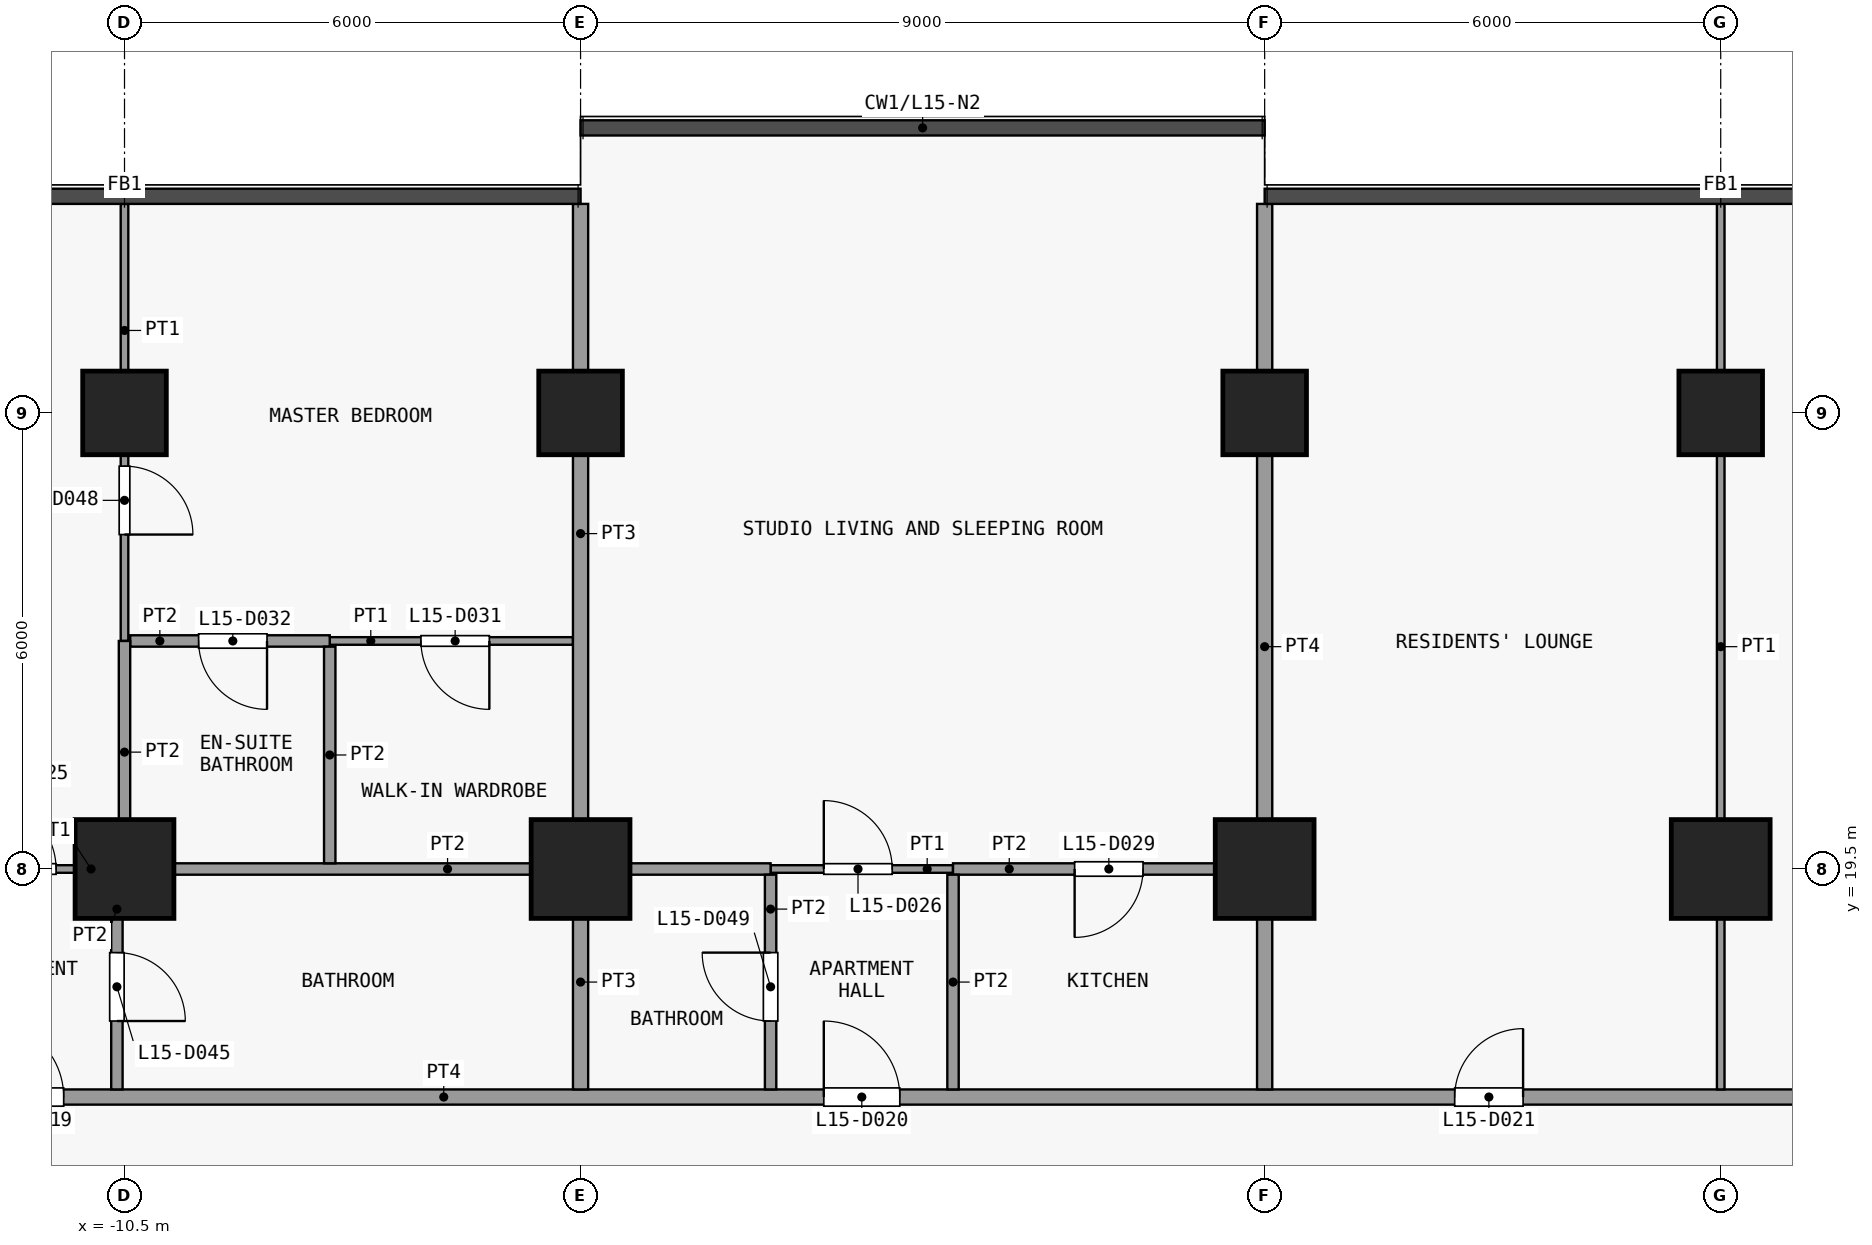
"""IFC4 building model, lengths in metres.
Left out: names, types, materials, properties, quantities, classifications, styles, units other than length and angle.
Written with IfcOpenShell. Run it as: python <this file> out.ifc"""

import sys

from ifc_helpers import new_model, si_unit, direction, frame, frame_2d, origin, origin_2d, place, context, subcontext, project, spatial, rectangle, extrude, element, fill, save


model = new_model("IFC4")
c1 = context("Model", 3, precision=1e-05, world=origin(), true_north=direction((0.0, 1.0)))
c2 = subcontext(c1, "Body", "Model", "MODEL_VIEW")
j1 = project(units=[si_unit("LENGTHUNIT", "METRE"), si_unit("PLANEANGLEUNIT", "RADIAN")], contexts=[c1])
p1 = place(None, origin())
s1 = spatial("IfcSite", under=j1, at=p1, CompositionType="ELEMENT")
p2 = place(p1, origin())
s2 = spatial("IfcBuilding", under=s1, at=p2, CompositionType="ELEMENT")
p3 = place(p2, frame((0.0, 0.0, 64.9)))
s3 = spatial("IfcBuildingStorey", under=s2, at=p3, CompositionType="ELEMENT", Elevation=64.9)
p4 = place(p3, frame((-10.5, 19.5, 0.0), z_axis=(0.0, 0.0, 1.0), x_axis=(1.0, 0.0, 0.0)))
e1 = element("IfcColumn", 1, at=p4, inside=s3, PredefinedType="COLUMN", context=c2, shape_type="SweptSolid", body=[
    extrude(rectangle(XDim=1.3, YDim=1.3, at=origin_2d()), origin(), (0.0, 0.0, 1.0), 3.6),
])
p5 = place(p3, frame((-10.5, 25.5, 0.0), z_axis=(0.0, 0.0, 1.0), x_axis=(1.0, 0.0, 0.0)))
e2 = element("IfcColumn", 2, at=p5, inside=s3, PredefinedType="COLUMN", context=c2, shape_type="SweptSolid", body=[
    extrude(rectangle(XDim=1.1, YDim=1.1, at=origin_2d()), origin(), (0.0, 0.0, 1.0), 3.6),
])
p6 = place(p3, frame((-4.5, 19.5, 0.0), z_axis=(0.0, 0.0, 1.0), x_axis=(1.0, 0.0, 0.0)))
e3 = element("IfcColumn", 3, at=p6, inside=s3, PredefinedType="COLUMN", context=c2, shape_type="SweptSolid", body=[
    extrude(rectangle(XDim=1.3, YDim=1.3, at=origin_2d()), origin(), (0.0, 0.0, 1.0), 3.6),
])
p7 = place(p3, frame((-4.5, 25.5, 0.0), z_axis=(0.0, 0.0, 1.0), x_axis=(1.0, 0.0, 0.0)))
e4 = element("IfcColumn", 4, at=p7, inside=s3, PredefinedType="COLUMN", context=c2, shape_type="SweptSolid", body=[
    extrude(rectangle(XDim=1.1, YDim=1.1, at=origin_2d()), origin(), (0.0, 0.0, 1.0), 3.6),
])
p8 = place(p3, frame((4.5, 19.5, 0.0), z_axis=(0.0, 0.0, 1.0), x_axis=(1.0, 0.0, 0.0)))
e5 = element("IfcColumn", 5, at=p8, inside=s3, PredefinedType="COLUMN", context=c2, shape_type="SweptSolid", body=[
    extrude(rectangle(XDim=1.3, YDim=1.3, at=origin_2d()), origin(), (0.0, 0.0, 1.0), 3.6),
])
p9 = place(p3, frame((4.5, 25.5, 0.0), z_axis=(0.0, 0.0, 1.0), x_axis=(1.0, 0.0, 0.0)))
e6 = element("IfcColumn", 6, at=p9, inside=s3, PredefinedType="COLUMN", context=c2, shape_type="SweptSolid", body=[
    extrude(rectangle(XDim=1.1, YDim=1.1, at=origin_2d()), origin(), (0.0, 0.0, 1.0), 3.6),
])
p10 = place(p3, frame((10.5, 19.5, 0.0), z_axis=(0.0, 0.0, 1.0), x_axis=(1.0, 0.0, 0.0)))
e7 = element("IfcColumn", 7, at=p10, inside=s3, PredefinedType="COLUMN", context=c2, shape_type="SweptSolid", body=[
    extrude(rectangle(XDim=1.3, YDim=1.3, at=origin_2d()), origin(), (0.0, 0.0, 1.0), 3.6),
])
p11 = place(p3, frame((10.5, 25.5, 0.0), z_axis=(0.0, 0.0, 1.0), x_axis=(1.0, 0.0, 0.0)))
e8 = element("IfcColumn", 8, at=p11, inside=s3, PredefinedType="COLUMN", context=c2, shape_type="SweptSolid", body=[
    extrude(rectangle(XDim=1.1, YDim=1.1, at=origin_2d()), origin(), (0.0, 0.0, 1.0), 3.6),
])
p12 = place(p3, frame((-25.35, 16.5, 0.0), z_axis=(0.0, 0.0, 1.0), x_axis=(1.0, 0.0, 0.0)))
e9 = element("IfcWall", 9, at=p12, inside=s3, PredefinedType="PARTITIONING", context=c2, shape_type="SweptSolid", body=[
    extrude(rectangle(XDim=51.6, YDim=0.2, at=frame_2d((25.8, 0.0))), origin(), (0.0, 0.0, 1.0), 3.3),
])
p13 = place(p12, frame((4.55, 0.0, 0.0)))
e10 = element("IfcOpeningElement", 10, at=p13, cuts=e9, PredefinedType="OPENING", context=c2, shape_type="SweptSolid", body=[
    extrude(rectangle(XDim=1.0, YDim=2.1, at=frame_2d((0.5, 1.05))), frame((0.0, 0.11, 0.0), z_axis=(0.0, -1.0, 0.0), x_axis=(1.0, 0.0, 0.0)), (0.0, 0.0, 1.0), 0.22),
])
p14 = place(p12, frame((13.05, 0.0, 0.0)))
e11 = element("IfcOpeningElement", 11, at=p14, cuts=e9, PredefinedType="OPENING", context=c2, shape_type="SweptSolid", body=[
    extrude(rectangle(XDim=1.0, YDim=2.1, at=frame_2d((0.5, 1.05))), frame((0.0, 0.11, 0.0), z_axis=(0.0, -1.0, 0.0), x_axis=(1.0, 0.0, 0.0)), (0.0, 0.0, 1.0), 0.22),
])
p15 = place(p12, frame((24.05, 0.0, 0.0)))
e12 = element("IfcOpeningElement", 12, at=p15, cuts=e9, PredefinedType="OPENING", context=c2, shape_type="SweptSolid", body=[
    extrude(rectangle(XDim=1.0, YDim=2.1, at=frame_2d((0.5, 1.05))), frame((0.0, 0.11, 0.0), z_axis=(0.0, -1.0, 0.0), x_axis=(1.0, 0.0, 0.0)), (0.0, 0.0, 1.0), 0.22),
])
p16 = place(p12, frame((32.35, 0.0, 0.0)))
e13 = element("IfcOpeningElement", 13, at=p16, cuts=e9, PredefinedType="OPENING", context=c2, shape_type="SweptSolid", body=[
    extrude(rectangle(XDim=0.9, YDim=2.1, at=frame_2d((0.45, 1.05))), frame((0.0, 0.11, 0.0), z_axis=(0.0, -1.0, 0.0), x_axis=(1.0, 0.0, 0.0)), (0.0, 0.0, 1.0), 0.22),
])
p17 = place(p12, frame((38.35, 0.0, 0.0)))
e14 = element("IfcOpeningElement", 14, at=p17, cuts=e9, PredefinedType="OPENING", context=c2, shape_type="SweptSolid", body=[
    extrude(rectangle(XDim=0.9, YDim=2.1, at=frame_2d((0.45, 1.05))), frame((0.0, 0.11, 0.0), z_axis=(0.0, -1.0, 0.0), x_axis=(1.0, 0.0, 0.0)), (0.0, 0.0, 1.0), 0.22),
])
p18 = place(p12, frame((45.05, 0.0, 0.0)))
e15 = element("IfcOpeningElement", 15, at=p18, cuts=e9, PredefinedType="OPENING", context=c2, shape_type="SweptSolid", body=[
    extrude(rectangle(XDim=1.0, YDim=2.1, at=frame_2d((0.5, 1.05))), frame((0.0, 0.11, 0.0), z_axis=(0.0, -1.0, 0.0), x_axis=(1.0, 0.0, 0.0)), (0.0, 0.0, 1.0), 0.22),
])
p19 = place(p3, frame((-13.0, 19.5, 0.0), z_axis=(0.0, 0.0, 1.0), x_axis=(1.0, 0.0, 0.0)))
e16 = element("IfcWall", 16, at=p19, inside=s3, PredefinedType="PARTITIONING", context=c2, shape_type="SweptSolid", body=[
    extrude(rectangle(XDim=2.4, YDim=0.1, at=frame_2d((1.2, 0.0))), origin(), (0.0, 0.0, 1.0), 3.3),
])
p20 = place(p19, frame((0.7, 0.0, 0.0)))
e17 = element("IfcOpeningElement", 17, at=p20, cuts=e16, PredefinedType="OPENING", context=c2, shape_type="SweptSolid", body=[
    extrude(rectangle(XDim=0.9, YDim=2.1, at=frame_2d((0.45, 1.05))), frame((0.0, 0.06, 0.0), z_axis=(0.0, -1.0, 0.0), x_axis=(1.0, 0.0, 0.0)), (0.0, 0.0, 1.0), 0.12),
])
p21 = place(p3, frame((-2.0, 19.5, 0.0), z_axis=(0.0, 0.0, 1.0), x_axis=(1.0, 0.0, 0.0)))
e18 = element("IfcWall", 18, at=p21, inside=s3, PredefinedType="PARTITIONING", context=c2, shape_type="SweptSolid", body=[
    extrude(rectangle(XDim=2.4, YDim=0.1, at=frame_2d((1.2, 0.0))), origin(), (0.0, 0.0, 1.0), 3.3),
])
p22 = place(p21, frame((0.7, 0.0, 0.0)))
e19 = element("IfcOpeningElement", 19, at=p22, cuts=e18, PredefinedType="OPENING", context=c2, shape_type="SweptSolid", body=[
    extrude(rectangle(XDim=0.9, YDim=2.1, at=frame_2d((0.45, 1.05))), frame((0.0, 0.06, 0.0), z_axis=(0.0, -1.0, 0.0), x_axis=(1.0, 0.0, 0.0)), (0.0, 0.0, 1.0), 0.12),
])
p23 = place(p3, frame((-10.5, 19.5, 0.0), z_axis=(0.0, 0.0, 1.0), x_axis=(1.0, 0.0, 0.0)))
e20 = element("IfcWall", 20, at=p23, inside=s3, PredefinedType="PARTITIONING", context=c2, shape_type="SweptSolid", body=[
    extrude(rectangle(XDim=8.5, YDim=0.15, at=frame_2d((4.25, 0.0))), origin(), (0.0, 0.0, 1.0), 3.3),
])
p24 = place(p3, frame((0.4, 19.5, 0.0), z_axis=(0.0, 0.0, 1.0), x_axis=(1.0, 0.0, 0.0)))
e21 = element("IfcWall", 21, at=p24, inside=s3, PredefinedType="PARTITIONING", context=c2, shape_type="SweptSolid", body=[
    extrude(rectangle(XDim=4.0, YDim=0.15, at=frame_2d((2.0, 0.0))), origin(), (0.0, 0.0, 1.0), 3.3),
])
p25 = place(p24, frame((1.6, 0.0, 0.0)))
e22 = element("IfcOpeningElement", 22, at=p25, cuts=e21, PredefinedType="OPENING", context=c2, shape_type="SweptSolid", body=[
    extrude(rectangle(XDim=0.9, YDim=2.1, at=frame_2d((0.45, 1.05))), frame((0.0, 0.085, 0.0), z_axis=(0.0, -1.0, 0.0), x_axis=(1.0, 0.0, 0.0)), (0.0, 0.0, 1.0), 0.17),
])
p26 = place(p3, frame((-7.8, 22.5, 0.0), z_axis=(0.0, 0.0, 1.0), x_axis=(1.0, 0.0, 0.0)))
e23 = element("IfcWall", 23, at=p26, inside=s3, PredefinedType="PARTITIONING", context=c2, shape_type="SweptSolid", body=[
    extrude(rectangle(XDim=3.2, YDim=0.1, at=frame_2d((1.6, 0.0))), origin(), (0.0, 0.0, 1.0), 3.3),
])
p27 = place(p26, frame((1.2, 0.0, 0.0)))
e24 = element("IfcOpeningElement", 24, at=p27, cuts=e23, PredefinedType="OPENING", context=c2, shape_type="SweptSolid", body=[
    extrude(rectangle(XDim=0.9, YDim=2.1, at=frame_2d((0.45, 1.05))), frame((0.0, 0.06, 0.0), z_axis=(0.0, -1.0, 0.0), x_axis=(1.0, 0.0, 0.0)), (0.0, 0.0, 1.0), 0.12),
])
p28 = place(p3, frame((-10.425, 22.5, 0.0), z_axis=(0.0, 0.0, 1.0), x_axis=(1.0, 0.0, 0.0)))
e25 = element("IfcWall", 25, at=p28, inside=s3, PredefinedType="PARTITIONING", context=c2, shape_type="SweptSolid", body=[
    extrude(rectangle(XDim=2.625, YDim=0.15, at=frame_2d((1.312, 0.0))), origin(), (0.0, 0.0, 1.0), 3.3),
])
p29 = place(p28, frame((0.9, 0.0, 0.0)))
e26 = element("IfcOpeningElement", 26, at=p29, cuts=e25, PredefinedType="OPENING", context=c2, shape_type="SweptSolid", body=[
    extrude(rectangle(XDim=0.9, YDim=2.1, at=frame_2d((0.45, 1.05))), frame((0.0, 0.085, 0.0), z_axis=(0.0, -1.0, 0.0), x_axis=(1.0, 0.0, 0.0)), (0.0, 0.0, 1.0), 0.17),
])
p30 = place(p3, frame((-10.6, 16.6, 0.0), z_axis=(0.0, 0.0, 1.0), x_axis=(0.0, 1.0, 0.0)))
e27 = element("IfcWall", 27, at=p30, inside=s3, PredefinedType="PARTITIONING", context=c2, shape_type="SweptSolid", body=[
    extrude(rectangle(XDim=2.825, YDim=0.15, at=frame_2d((1.413, 0.0))), origin(), (0.0, 0.0, 1.0), 3.3),
])
p31 = place(p30, frame((0.9, 0.0, 0.0)))
e28 = element("IfcOpeningElement", 28, at=p31, cuts=e27, PredefinedType="OPENING", context=c2, shape_type="SweptSolid", body=[
    extrude(rectangle(XDim=0.9, YDim=2.1, at=frame_2d((0.45, 1.05))), frame((0.0, 0.085, 0.0), z_axis=(0.0, -1.0, 0.0), x_axis=(1.0, 0.0, 0.0)), (0.0, 0.0, 1.0), 0.17),
])
p32 = place(p3, frame((-10.5, 22.5, 0.0), z_axis=(0.0, 0.0, 1.0), x_axis=(0.0, 1.0, 0.0)))
e29 = element("IfcWall", 29, at=p32, inside=s3, PredefinedType="PARTITIONING", context=c2, shape_type="SweptSolid", body=[
    extrude(rectangle(XDim=5.75, YDim=0.1, at=frame_2d((2.875, 0.0))), origin(), (0.0, 0.0, 1.0), 3.3),
])
p33 = place(p32, frame((1.4, 0.0, 0.0)))
e30 = element("IfcOpeningElement", 30, at=p33, cuts=e29, PredefinedType="OPENING", context=c2, shape_type="SweptSolid", body=[
    extrude(rectangle(XDim=0.9, YDim=2.1, at=frame_2d((0.45, 1.05))), frame((0.0, 0.06, 0.0), z_axis=(0.0, -1.0, 0.0), x_axis=(1.0, 0.0, 0.0)), (0.0, 0.0, 1.0), 0.12),
])
p34 = place(p3, frame((-10.5, 19.575, 0.0), z_axis=(0.0, 0.0, 1.0), x_axis=(0.0, 1.0, 0.0)))
e31 = element("IfcWall", 31, at=p34, inside=s3, PredefinedType="PARTITIONING", context=c2, shape_type="SweptSolid", body=[
    extrude(rectangle(XDim=2.925, YDim=0.15, at=frame_2d((1.462, 0.0))), origin(), (0.0, 0.0, 1.0), 3.3),
])
p35 = place(p3, frame((-7.8, 19.575, 0.0), z_axis=(0.0, 0.0, 1.0), x_axis=(0.0, 1.0, 0.0)))
e32 = element("IfcWall", 32, at=p35, inside=s3, PredefinedType="PARTITIONING", context=c2, shape_type="SweptSolid", body=[
    extrude(rectangle(XDim=2.85, YDim=0.15, at=frame_2d((1.425, 0.0))), origin(), (0.0, 0.0, 1.0), 3.3),
])
p36 = place(p3, frame((-4.5, 16.6, 0.0), z_axis=(0.0, 0.0, 1.0), x_axis=(0.0, 1.0, 0.0)))
e33 = element("IfcWall", 33, at=p36, inside=s3, PredefinedType="PARTITIONING", context=c2, shape_type="SweptSolid", body=[
    extrude(rectangle(XDim=2.825, YDim=0.2, at=frame_2d((1.413, 0.0))), origin(), (0.0, 0.0, 1.0), 3.3),
])
p37 = place(p3, frame((-4.5, 19.575, 0.0), z_axis=(0.0, 0.0, 1.0), x_axis=(0.0, 1.0, 0.0)))
e34 = element("IfcWall", 34, at=p37, inside=s3, PredefinedType="PARTITIONING", context=c2, shape_type="SweptSolid", body=[
    extrude(rectangle(XDim=8.675, YDim=0.2, at=frame_2d((4.337, 0.0))), origin(), (0.0, 0.0, 1.0), 3.3),
])
p38 = place(p3, frame((-2.0, 16.6, 0.0), z_axis=(0.0, 0.0, 1.0), x_axis=(0.0, 1.0, 0.0)))
e35 = element("IfcWall", 35, at=p38, inside=s3, PredefinedType="PARTITIONING", context=c2, shape_type="SweptSolid", body=[
    extrude(rectangle(XDim=2.825, YDim=0.15, at=frame_2d((1.413, 0.0))), origin(), (0.0, 0.0, 1.0), 3.3),
])
p39 = place(p38, frame((0.9, 0.0, 0.0)))
e36 = element("IfcOpeningElement", 36, at=p39, cuts=e35, PredefinedType="OPENING", context=c2, shape_type="SweptSolid", body=[
    extrude(rectangle(XDim=0.9, YDim=2.1, at=frame_2d((0.45, 1.05))), frame((0.0, 0.085, 0.0), z_axis=(0.0, -1.0, 0.0), x_axis=(1.0, 0.0, 0.0)), (0.0, 0.0, 1.0), 0.17),
])
p40 = place(p3, frame((0.4, 16.6, 0.0), z_axis=(0.0, 0.0, 1.0), x_axis=(0.0, 1.0, 0.0)))
e37 = element("IfcWall", 37, at=p40, inside=s3, PredefinedType="PARTITIONING", context=c2, shape_type="SweptSolid", body=[
    extrude(rectangle(XDim=2.825, YDim=0.15, at=frame_2d((1.413, 0.0))), origin(), (0.0, 0.0, 1.0), 3.3),
])
p41 = place(p3, frame((4.5, 16.6, 0.0), z_axis=(0.0, 0.0, 1.0), x_axis=(0.0, 1.0, 0.0)))
e38 = element("IfcWall", 38, at=p41, inside=s3, PredefinedType="PARTITIONING", context=c2, shape_type="SweptSolid", body=[
    extrude(rectangle(XDim=11.65, YDim=0.2, at=frame_2d((5.825, 0.0))), origin(), (0.0, 0.0, 1.0), 3.3),
])
p42 = place(p3, frame((10.5, 16.6, 0.0), z_axis=(0.0, 0.0, 1.0), x_axis=(0.0, 1.0, 0.0)))
e39 = element("IfcWall", 39, at=p42, inside=s3, PredefinedType="PARTITIONING", context=c2, shape_type="SweptSolid", body=[
    extrude(rectangle(XDim=11.65, YDim=0.1, at=frame_2d((5.825, 0.0))), origin(), (0.0, 0.0, 1.0), 3.3),
])
p43 = place(p14, origin())
e40 = element("IfcDoor", 40, at=p43, inside=s3, OperationType="SINGLE_SWING_RIGHT", PredefinedType="DOOR", context=c2, shape_type="SweptSolid", body=[
    extrude(rectangle(XDim=1.0, YDim=2.1, at=frame_2d((0.5, 1.05))), frame((0.0, 0.025, 0.0), z_axis=(0.0, -1.0, 0.0), x_axis=(1.0, 0.0, 0.0)), (0.0, 0.0, 1.0), 0.05),
])
fill(e11, e40)
p44 = place(p15, origin())
e41 = element("IfcDoor", 41, at=p44, inside=s3, OperationType="SINGLE_SWING_RIGHT", PredefinedType="DOOR", context=c2, shape_type="SweptSolid", body=[
    extrude(rectangle(XDim=1.0, YDim=2.1, at=frame_2d((0.5, 1.05))), frame((0.0, 0.025, 0.0), z_axis=(0.0, -1.0, 0.0), x_axis=(1.0, 0.0, 0.0)), (0.0, 0.0, 1.0), 0.05),
])
fill(e12, e41)
p45 = place(p16, origin())
e42 = element("IfcDoor", 42, at=p45, inside=s3, OperationType="SINGLE_SWING_LEFT", PredefinedType="DOOR", context=c2, shape_type="SweptSolid", body=[
    extrude(rectangle(XDim=0.9, YDim=2.1, at=frame_2d((0.45, 1.05))), frame((0.0, 0.025, 0.0), z_axis=(0.0, -1.0, 0.0), x_axis=(1.0, 0.0, 0.0)), (0.0, 0.0, 1.0), 0.05),
])
fill(e13, e42)
p46 = place(p20, origin())
e43 = element("IfcDoor", 43, at=p46, inside=s3, OperationType="SINGLE_SWING_RIGHT", PredefinedType="DOOR", context=c2, shape_type="SweptSolid", body=[
    extrude(rectangle(XDim=0.9, YDim=2.1, at=frame_2d((0.45, 1.05))), frame((0.0, 0.025, 0.0), z_axis=(0.0, -1.0, 0.0), x_axis=(1.0, 0.0, 0.0)), (0.0, 0.0, 1.0), 0.05),
])
fill(e17, e43)
p47 = place(p22, origin())
e44 = element("IfcDoor", 44, at=p47, inside=s3, OperationType="SINGLE_SWING_RIGHT", PredefinedType="DOOR", context=c2, shape_type="SweptSolid", body=[
    extrude(rectangle(XDim=0.9, YDim=2.1, at=frame_2d((0.45, 1.05))), frame((0.0, 0.025, 0.0), z_axis=(0.0, -1.0, 0.0), x_axis=(1.0, 0.0, 0.0)), (0.0, 0.0, 1.0), 0.05),
])
fill(e19, e44)
p48 = place(p25, origin())
e45 = element("IfcDoor", 45, at=p48, inside=s3, OperationType="SINGLE_SWING_LEFT", PredefinedType="DOOR", context=c2, shape_type="SweptSolid", body=[
    extrude(rectangle(XDim=0.9, YDim=2.1, at=frame_2d((0.45, 1.05))), frame((0.0, 0.025, 0.0), z_axis=(0.0, -1.0, 0.0), x_axis=(1.0, 0.0, 0.0)), (0.0, 0.0, 1.0), 0.05),
])
fill(e22, e45)
p49 = place(p27, origin())
e46 = element("IfcDoor", 46, at=p49, inside=s3, OperationType="SINGLE_SWING_RIGHT", PredefinedType="DOOR", context=c2, shape_type="SweptSolid", body=[
    extrude(rectangle(XDim=0.9, YDim=2.1, at=frame_2d((0.45, 1.05))), frame((0.0, 0.025, 0.0), z_axis=(0.0, -1.0, 0.0), x_axis=(1.0, 0.0, 0.0)), (0.0, 0.0, 1.0), 0.05),
])
fill(e24, e46)
p50 = place(p29, origin())
e47 = element("IfcDoor", 47, at=p50, inside=s3, OperationType="SINGLE_SWING_RIGHT", PredefinedType="DOOR", context=c2, shape_type="SweptSolid", body=[
    extrude(rectangle(XDim=0.9, YDim=2.1, at=frame_2d((0.45, 1.05))), frame((0.0, 0.025, 0.0), z_axis=(0.0, -1.0, 0.0), x_axis=(1.0, 0.0, 0.0)), (0.0, 0.0, 1.0), 0.05),
])
fill(e26, e47)
p51 = place(p31, origin())
e48 = element("IfcDoor", 48, at=p51, inside=s3, OperationType="SINGLE_SWING_LEFT", PredefinedType="DOOR", context=c2, shape_type="SweptSolid", body=[
    extrude(rectangle(XDim=0.9, YDim=2.1, at=frame_2d((0.45, 1.05))), frame((0.0, 0.025, 0.0), z_axis=(0.0, -1.0, 0.0), x_axis=(1.0, 0.0, 0.0)), (0.0, 0.0, 1.0), 0.05),
])
fill(e28, e48)
p52 = place(p33, origin())
e49 = element("IfcDoor", 49, at=p52, inside=s3, OperationType="SINGLE_SWING_LEFT", PredefinedType="DOOR", context=c2, shape_type="SweptSolid", body=[
    extrude(rectangle(XDim=0.9, YDim=2.1, at=frame_2d((0.45, 1.05))), frame((0.0, 0.025, 0.0), z_axis=(0.0, -1.0, 0.0), x_axis=(1.0, 0.0, 0.0)), (0.0, 0.0, 1.0), 0.05),
])
fill(e30, e49)
p53 = place(p39, origin())
e50 = element("IfcDoor", 50, at=p53, inside=s3, OperationType="SINGLE_SWING_LEFT", PredefinedType="DOOR", context=c2, shape_type="SweptSolid", body=[
    extrude(rectangle(XDim=0.9, YDim=2.1, at=frame_2d((0.45, 1.05))), frame((0.0, 0.025, 0.0), z_axis=(0.0, -1.0, 0.0), x_axis=(1.0, 0.0, 0.0)), (0.0, 0.0, 1.0), 0.05),
])
fill(e36, e50)
save(model, sys.argv[1])
